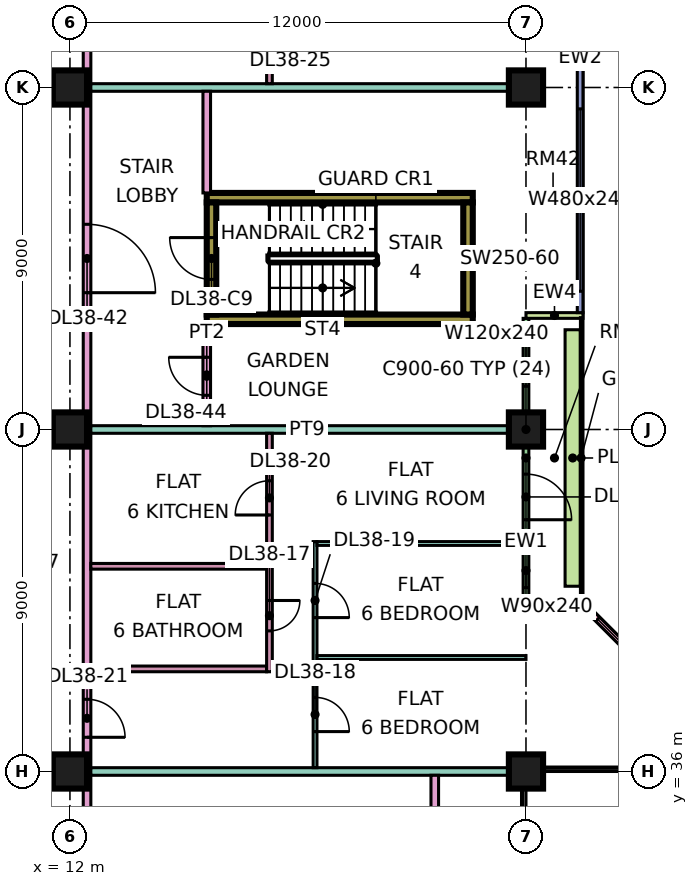
"""IFC4 building model, lengths in metres.
Left out: names, types, materials, properties, quantities, classifications, styles, units other than length and angle.
Written with IfcOpenShell. Run it as: python <this file> out.ifc"""

import sys

from ifc_helpers import new_model, si_unit, direction, frame, frame_2d, origin, origin_2d, place, context, subcontext, project, spatial, rectangle, extrude, element, fill, save


model = new_model("IFC4")
c1 = context("Model", 3, precision=1e-05, world=origin(), true_north=direction((0.0, 1.0)))
c2 = subcontext(c1, "Body", "Model", "MODEL_VIEW")
j1 = project(units=[si_unit("LENGTHUNIT", "METRE"), si_unit("PLANEANGLEUNIT", "RADIAN")], contexts=[c1])
p1 = place(None, origin())
s1 = spatial("IfcSite", under=j1, at=p1, CompositionType="ELEMENT")
p2 = place(p1, origin())
s2 = spatial("IfcBuilding", under=s1, at=p2, CompositionType="ELEMENT")
p3 = place(p2, frame((0.0, 0.0, 168.65)))
s3 = spatial("IfcBuildingStorey", under=s2, at=p3, CompositionType="ELEMENT", Elevation=168.65)
for number, where, z_axis, x_axis in (
    (1, (12.0, 36.0, 0.0), (0.0, 0.0, 1.0), (1.0, 0.0, 0.0)),
    (2, (12.0, 45.0, 0.0), (0.0, 0.0, 1.0), (1.0, 0.0, 0.0)),
    (3, (12.0, 54.0, 0.0), (0.0, 0.0, 1.0), (1.0, 0.0, 0.0)),
    (4, (24.0, 36.0, 0.0), (0.0, 0.0, 1.0), (1.0, 0.0, 0.0)),
    (5, (24.0, 45.0, 0.0), (0.0, 0.0, 1.0), (1.0, 0.0, 0.0)),
    (6, (24.0, 54.0, 0.0), (0.0, 0.0, 1.0), (1.0, 0.0, 0.0)),
):
    element("IfcColumn", number, at=place(p3, frame(where, z_axis=z_axis, x_axis=x_axis)), inside=s3, PredefinedType="COLUMN", context=c2, shape_type="SweptSolid", body=[
        extrude(rectangle(XDim=0.9, YDim=0.9, at=origin_2d()), origin(), (0.0, 0.0, 1.0), 3.75),
    ])
for number, where, z_axis, x_axis in (
    (7, (15.6, 47.9, 0.0), (0.0, 0.0, 1.0), (1.0, 0.0, 0.0)),
    (8, (15.6, 51.1, 0.0), (0.0, 0.0, 1.0), (1.0, 0.0, 0.0)),
):
    element("IfcWall", number, at=place(p3, frame(where, z_axis=z_axis, x_axis=x_axis)), inside=s3, PredefinedType="SHEAR", context=c2, shape_type="SweptSolid", body=[
        extrude(rectangle(XDim=7.0, YDim=0.25, at=frame_2d((3.5, 0.0))), origin(), (0.0, 0.0, 1.0), 3.75),
    ])
p4 = place(p3, frame((15.725, 48.025, 0.0), z_axis=(0.0, 0.0, 1.0), x_axis=(0.0, 1.0, 0.0)))
e9 = element("IfcWall", 9, at=p4, inside=s3, PredefinedType="SHEAR", context=c2, shape_type="SweptSolid", body=[
    extrude(rectangle(XDim=2.95, YDim=0.25, at=frame_2d((1.475, 0.0))), origin(), (0.0, 0.0, 1.0), 3.75),
])
p5 = place(p4, frame((0.925, 0.0, 0.0)))
e10 = element("IfcOpeningElement", 10, at=p5, cuts=e9, PredefinedType="OPENING", context=c2, shape_type="SweptSolid", body=[
    extrude(rectangle(XDim=1.1, YDim=2.2, at=frame_2d((0.55, 1.1))), frame((0.0, 0.135, 0.0), z_axis=(0.0, -1.0, 0.0), x_axis=(1.0, 0.0, 0.0)), (0.0, 0.0, 1.0), 0.27),
])
p6 = place(p3, frame((22.475, 48.025, 0.0), z_axis=(0.0, 0.0, 1.0), x_axis=(0.0, 1.0, 0.0)))
e11 = element("IfcWall", 11, at=p6, inside=s3, PredefinedType="SHEAR", context=c2, shape_type="SweptSolid", body=[
    extrude(rectangle(XDim=2.95, YDim=0.25, at=frame_2d((1.475, 0.0))), origin(), (0.0, 0.0, 1.0), 3.75),
])
p7 = place(p3, frame((28.447, 37.447, 0.0), z_axis=(0.0, 0.0, 1.0), x_axis=(-0.707106781187, 0.707106781187, 0.0)))
e12 = element("IfcWall", 12, at=p7, inside=s3, PredefinedType="SOLIDWALL", context=c2, shape_type="SweptSolid", body=[
    extrude(rectangle(XDim=4.243, YDim=0.15, at=frame_2d((2.121, 0.0))), origin(), (0.0, 0.0, 1.0), 3.35),
])
p8 = place(p7, frame((0.621, 0.0, 0.45)))
e13 = element("IfcOpeningElement", 13, at=p8, cuts=e12, PredefinedType="OPENING", context=c2, shape_type="SweptSolid", body=[
    extrude(rectangle(XDim=3.0, YDim=2.4, at=frame_2d((1.5, 1.2))), frame((0.0, 0.085, 0.0), z_axis=(0.0, -1.0, 0.0), x_axis=(1.0, 0.0, 0.0)), (0.0, 0.0, 1.0), 0.17),
])
p9 = place(p3, frame((24.0, 40.575, 0.0), z_axis=(0.0, 0.0, 1.0), x_axis=(0.0, 1.0, 0.0)))
e14 = element("IfcWall", 14, at=p9, inside=s3, PredefinedType="SOLIDWALL", context=c2, shape_type="SweptSolid", body=[
    extrude(rectangle(XDim=7.35, YDim=0.15, at=frame_2d((3.675, 0.0))), origin(), (0.0, 0.0, 1.0), 3.35),
])
p10 = place(p9, frame((0.262, 0.0, 0.45)))
e15 = element("IfcOpeningElement", 15, at=p10, cuts=e14, PredefinedType="OPENING", context=c2, shape_type="SweptSolid", body=[
    extrude(rectangle(XDim=0.9, YDim=2.4, at=frame_2d((0.45, 1.2))), frame((0.0, 0.085, 0.0), z_axis=(0.0, -1.0, 0.0), x_axis=(1.0, 0.0, 0.0)), (0.0, 0.0, 1.0), 0.17),
])
p11 = place(p9, frame((2.05, 0.0, 0.0)))
e16 = element("IfcOpeningElement", 16, at=p11, cuts=e14, PredefinedType="OPENING", context=c2, shape_type="SweptSolid", body=[
    extrude(rectangle(XDim=1.2, YDim=2.4, at=frame_2d((0.6, 1.2))), frame((0.0, 0.085, 0.0), z_axis=(0.0, -1.0, 0.0), x_axis=(1.0, 0.0, 0.0)), (0.0, 0.0, 1.0), 0.17),
])
p12 = place(p9, frame((5.562, 0.0, 0.45)))
e17 = element("IfcOpeningElement", 17, at=p12, cuts=e14, PredefinedType="OPENING", context=c2, shape_type="SweptSolid", body=[
    extrude(rectangle(XDim=1.2, YDim=2.4, at=frame_2d((0.6, 1.2))), frame((0.0, 0.085, 0.0), z_axis=(0.0, -1.0, 0.0), x_axis=(1.0, 0.0, 0.0)), (0.0, 0.0, 1.0), 0.17),
])
for number, where, z_axis, x_axis in (
    (18, (25.5, 40.5, 0.0), (0.0, 0.0, 1.0), (-1.0, 0.0, 0.0)),
    (19, (25.5, 48.0, 0.0), (0.0, 0.0, 1.0), (-1.0, 0.0, 0.0)),
):
    element("IfcWall", number, at=place(p3, frame(where, z_axis=z_axis, x_axis=x_axis)), inside=s3, PredefinedType="SOLIDWALL", context=c2, shape_type="SweptSolid", body=[
        extrude(rectangle(XDim=1.5, YDim=0.15, at=frame_2d((0.75, 0.0))), origin(), (0.0, 0.0, 1.0), 3.35),
    ])
p13 = place(p3, frame((25.425, 48.075, 0.0), z_axis=(0.0, 0.0, 1.0), x_axis=(0.0, 1.0, 0.0)))
e20 = element("IfcWall", 20, at=p13, inside=s3, PredefinedType="SOLIDWALL", context=c2, shape_type="SweptSolid", body=[
    extrude(rectangle(XDim=13.425, YDim=0.15, at=frame_2d((6.712, 0.0))), origin(), (0.0, 0.0, 1.0), 3.35),
])
p14 = place(p13, frame((0.562, 0.0, 0.45)))
e21 = element("IfcOpeningElement", 21, at=p14, cuts=e20, PredefinedType="OPENING", context=c2, shape_type="SweptSolid", body=[
    extrude(rectangle(XDim=4.8, YDim=2.4, at=frame_2d((2.4, 1.2))), frame((0.0, 0.085, 0.0), z_axis=(0.0, -1.0, 0.0), x_axis=(1.0, 0.0, 0.0)), (0.0, 0.0, 1.0), 0.17),
])
p15 = place(p13, frame((6.525, 0.0, 0.45)))
e22 = element("IfcOpeningElement", 22, at=p15, cuts=e20, PredefinedType="OPENING", context=c2, shape_type="SweptSolid", body=[
    extrude(rectangle(XDim=1.8, YDim=2.4, at=frame_2d((0.9, 1.2))), frame((0.0, 0.085, 0.0), z_axis=(0.0, -1.0, 0.0), x_axis=(1.0, 0.0, 0.0)), (0.0, 0.0, 1.0), 0.17),
])
p16 = place(p13, frame((9.525, 0.0, 0.45)))
e23 = element("IfcOpeningElement", 23, at=p16, cuts=e20, PredefinedType="OPENING", context=c2, shape_type="SweptSolid", body=[
    extrude(rectangle(XDim=1.8, YDim=2.4, at=frame_2d((0.9, 1.2))), frame((0.0, 0.085, 0.0), z_axis=(0.0, -1.0, 0.0), x_axis=(1.0, 0.0, 0.0)), (0.0, 0.0, 1.0), 0.17),
])
p17 = place(p13, frame((12.225, 0.0, 0.45)))
e24 = element("IfcOpeningElement", 24, at=p17, cuts=e20, PredefinedType="OPENING", context=c2, shape_type="SweptSolid", body=[
    extrude(rectangle(XDim=0.9, YDim=2.4, at=frame_2d((0.45, 1.2))), frame((0.0, 0.085, 0.0), z_axis=(0.0, -1.0, 0.0), x_axis=(1.0, 0.0, 0.0)), (0.0, 0.0, 1.0), 0.17),
])
p18 = place(p3, frame((25.229, 40.875, 0.0), z_axis=(0.0, 0.0, 1.0), x_axis=(0.0, 1.0, 0.0)))
e25 = element("IfcWall", 25, at=p18, inside=s3, PredefinedType="SOLIDWALL", context=c2, shape_type="SweptSolid", body=[
    extrude(rectangle(XDim=6.75, YDim=0.4, at=frame_2d((3.375, 0.0))), origin(), (0.0, 0.0, 1.0), 0.7),
])
p19 = place(p3, frame((12.45, 20.0, 0.0), z_axis=(0.0, 0.0, 1.0), x_axis=(0.0, 1.0, 0.0)))
e26 = element("IfcWall", 26, at=p19, inside=s3, PredefinedType="PARTITIONING", context=c2, shape_type="SweptSolid", body=[
    extrude(rectangle(XDim=42.926, YDim=0.2, at=frame_2d((21.463, 0.0))), origin(), (0.0, 0.0, 1.0), 3.35),
])
p20 = place(p19, frame((6.55, 0.0, 0.0)))
e27 = element("IfcOpeningElement", 27, at=p20, cuts=e26, PredefinedType="OPENING", context=c2, shape_type="SweptSolid", body=[
    extrude(rectangle(XDim=1.0, YDim=2.1, at=frame_2d((0.5, 1.05))), frame((0.0, 0.11, 0.0), z_axis=(0.0, -1.0, 0.0), x_axis=(1.0, 0.0, 0.0)), (0.0, 0.0, 1.0), 0.22),
])
p21 = place(p19, frame((12.25, 0.0, 0.0)))
e28 = element("IfcOpeningElement", 28, at=p21, cuts=e26, PredefinedType="OPENING", context=c2, shape_type="SweptSolid", body=[
    extrude(rectangle(XDim=1.6, YDim=2.1, at=frame_2d((0.8, 1.05))), frame((0.0, 0.11, 0.0), z_axis=(0.0, -1.0, 0.0), x_axis=(1.0, 0.0, 0.0)), (0.0, 0.0, 1.0), 0.22),
])
p22 = place(p19, frame((16.9, 0.0, 0.0)))
e29 = element("IfcOpeningElement", 29, at=p22, cuts=e26, PredefinedType="OPENING", context=c2, shape_type="SweptSolid", body=[
    extrude(rectangle(XDim=1.0, YDim=2.1, at=frame_2d((0.5, 1.05))), frame((0.0, 0.11, 0.0), z_axis=(0.0, -1.0, 0.0), x_axis=(1.0, 0.0, 0.0)), (0.0, 0.0, 1.0), 0.22),
])
p23 = place(p19, frame((40.9, 0.0, 0.0)))
e30 = element("IfcOpeningElement", 30, at=p23, cuts=e26, PredefinedType="OPENING", context=c2, shape_type="SweptSolid", body=[
    extrude(rectangle(XDim=1.0, YDim=2.1, at=frame_2d((0.5, 1.05))), frame((0.0, 0.11, 0.0), z_axis=(0.0, -1.0, 0.0), x_axis=(1.0, 0.0, 0.0)), (0.0, 0.0, 1.0), 0.22),
])
p24 = place(p19, frame((1.15, 0.0, 0.0)))
e31 = element("IfcOpeningElement", 31, at=p24, cuts=e26, PredefinedType="OPENING", context=c2, shape_type="SweptSolid", body=[
    extrude(rectangle(XDim=1.8, YDim=2.1, at=frame_2d((0.9, 1.05))), frame((0.0, 0.11, 0.0), z_axis=(0.0, -1.0, 0.0), x_axis=(1.0, 0.0, 0.0)), (0.0, 0.0, 1.0), 0.22),
])
p25 = place(p19, frame((28.6, 0.0, 0.0)))
e32 = element("IfcOpeningElement", 32, at=p25, cuts=e26, PredefinedType="OPENING", context=c2, shape_type="SweptSolid", body=[
    extrude(rectangle(XDim=1.8, YDim=2.1, at=frame_2d((0.9, 1.05))), frame((0.0, 0.11, 0.0), z_axis=(0.0, -1.0, 0.0), x_axis=(1.0, 0.0, 0.0)), (0.0, 0.0, 1.0), 0.22),
])
p26 = place(p3, frame((12.55, 36.0, 0.0), z_axis=(0.0, 0.0, 1.0), x_axis=(1.0, 0.0, 0.0)))
e33 = element("IfcWall", 33, at=p26, inside=s3, PredefinedType="PARTITIONING", context=c2, shape_type="SweptSolid", body=[
    extrude(rectangle(XDim=11.45, YDim=0.2, at=frame_2d((5.725, 0.0))), origin(), (0.0, 0.0, 1.0), 3.35),
])
for number, where, z_axis, x_axis in (
    (34, (12.55, 38.7, 0.0), (0.0, 0.0, 1.0), (1.0, 0.0, 0.0)),
    (35, (12.55, 41.4, 0.0), (0.0, 0.0, 1.0), (1.0, 0.0, 0.0)),
):
    element("IfcWall", number, at=place(p3, frame(where, z_axis=z_axis, x_axis=x_axis)), inside=s3, PredefinedType="PARTITIONING", context=c2, shape_type="SweptSolid", body=[
        extrude(rectangle(XDim=4.625, YDim=0.15, at=frame_2d((2.312, 0.0))), origin(), (0.0, 0.0, 1.0), 3.35),
    ])
p27 = place(p3, frame((12.55, 45.0, 0.0), z_axis=(0.0, 0.0, 1.0), x_axis=(1.0, 0.0, 0.0)))
e36 = element("IfcWall", 36, at=p27, inside=s3, PredefinedType="PARTITIONING", context=c2, shape_type="SweptSolid", body=[
    extrude(rectangle(XDim=11.376, YDim=0.2, at=frame_2d((5.688, 0.0))), origin(), (0.0, 0.0, 1.0), 3.35),
])
p28 = place(p3, frame((12.55, 54.0, 0.0), z_axis=(0.0, 0.0, 1.0), x_axis=(1.0, 0.0, 0.0)))
e37 = element("IfcWall", 37, at=p28, inside=s3, PredefinedType="PARTITIONING", context=c2, shape_type="SweptSolid", body=[
    extrude(rectangle(XDim=11.45, YDim=0.2, at=frame_2d((5.725, 0.0))), origin(), (0.0, 0.0, 1.0), 3.35),
])
p29 = place(p3, frame((15.6, 45.1, 0.0), z_axis=(0.0, 0.0, 1.0), x_axis=(0.0, 1.0, 0.0)))
e38 = element("IfcWall", 38, at=p29, inside=s3, PredefinedType="PARTITIONING", context=c2, shape_type="SweptSolid", body=[
    extrude(rectangle(XDim=2.675, YDim=0.2, at=frame_2d((1.337, 0.0))), origin(), (0.0, 0.0, 1.0), 3.35),
])
p30 = place(p29, frame((0.8, 0.0, 0.0)))
e39 = element("IfcOpeningElement", 39, at=p30, cuts=e38, PredefinedType="OPENING", context=c2, shape_type="SweptSolid", body=[
    extrude(rectangle(XDim=1.0, YDim=2.1, at=frame_2d((0.5, 1.05))), frame((0.0, 0.11, 0.0), z_axis=(0.0, -1.0, 0.0), x_axis=(1.0, 0.0, 0.0)), (0.0, 0.0, 1.0), 0.22),
])
p31 = place(p3, frame((15.6, 51.225, 0.0), z_axis=(0.0, 0.0, 1.0), x_axis=(0.0, 1.0, 0.0)))
e40 = element("IfcWall", 40, at=p31, inside=s3, PredefinedType="PARTITIONING", context=c2, shape_type="SweptSolid", body=[
    extrude(rectangle(XDim=2.675, YDim=0.2, at=frame_2d((1.337, 0.0))), origin(), (0.0, 0.0, 1.0), 3.35),
])
p32 = place(p3, frame((17.25, 38.625, 0.0), z_axis=(0.0, 0.0, 1.0), x_axis=(0.0, 1.0, 0.0)))
e41 = element("IfcWall", 41, at=p32, inside=s3, PredefinedType="PARTITIONING", context=c2, shape_type="SweptSolid", body=[
    extrude(rectangle(XDim=6.275, YDim=0.15, at=frame_2d((3.137, 0.0))), origin(), (0.0, 0.0, 1.0), 3.35),
])
p33 = place(p32, frame((1.075, 0.0, 0.0)))
e42 = element("IfcOpeningElement", 42, at=p33, cuts=e41, PredefinedType="OPENING", context=c2, shape_type="SweptSolid", body=[
    extrude(rectangle(XDim=0.8, YDim=2.1, at=frame_2d((0.4, 1.05))), frame((0.0, 0.085, 0.0), z_axis=(0.0, -1.0, 0.0), x_axis=(1.0, 0.0, 0.0)), (0.0, 0.0, 1.0), 0.17),
])
p34 = place(p32, frame((4.125, 0.0, 0.0)))
e43 = element("IfcOpeningElement", 43, at=p34, cuts=e41, PredefinedType="OPENING", context=c2, shape_type="SweptSolid", body=[
    extrude(rectangle(XDim=0.9, YDim=2.1, at=frame_2d((0.45, 1.05))), frame((0.0, 0.085, 0.0), z_axis=(0.0, -1.0, 0.0), x_axis=(1.0, 0.0, 0.0)), (0.0, 0.0, 1.0), 0.17),
])
p35 = place(p3, frame((17.25, 54.1, 0.0), z_axis=(0.0, 0.0, 1.0), x_axis=(0.0, 1.0, 0.0)))
e44 = element("IfcWall", 44, at=p35, inside=s3, PredefinedType="PARTITIONING", context=c2, shape_type="SweptSolid", body=[
    extrude(rectangle(XDim=5.675, YDim=0.15, at=frame_2d((2.837, 0.0))), origin(), (0.0, 0.0, 1.0), 3.35),
])
p36 = place(p35, frame((1.1, 0.0, 0.0)))
e45 = element("IfcOpeningElement", 45, at=p36, cuts=e44, PredefinedType="OPENING", context=c2, shape_type="SweptSolid", body=[
    extrude(rectangle(XDim=0.9, YDim=2.1, at=frame_2d((0.45, 1.05))), frame((0.0, 0.085, 0.0), z_axis=(0.0, -1.0, 0.0), x_axis=(1.0, 0.0, 0.0)), (0.0, 0.0, 1.0), 0.17),
])
p37 = place(p3, frame((18.45, 36.1, 0.0), z_axis=(0.0, 0.0, 1.0), x_axis=(0.0, 1.0, 0.0)))
e46 = element("IfcWall", 46, at=p37, inside=s3, PredefinedType="PARTITIONING", context=c2, shape_type="SweptSolid", body=[
    extrude(rectangle(XDim=5.95, YDim=0.1, at=frame_2d((2.975, 0.0))), origin(), (0.0, 0.0, 1.0), 3.35),
])
p38 = place(p37, frame((0.95, 0.0, 0.0)))
e47 = element("IfcOpeningElement", 47, at=p38, cuts=e46, PredefinedType="OPENING", context=c2, shape_type="SweptSolid", body=[
    extrude(rectangle(XDim=0.9, YDim=2.1, at=frame_2d((0.45, 1.05))), frame((0.0, 0.06, 0.0), z_axis=(0.0, -1.0, 0.0), x_axis=(1.0, 0.0, 0.0)), (0.0, 0.0, 1.0), 0.12),
])
p39 = place(p37, frame((3.95, 0.0, 0.0)))
e48 = element("IfcOpeningElement", 48, at=p39, cuts=e46, PredefinedType="OPENING", context=c2, shape_type="SweptSolid", body=[
    extrude(rectangle(XDim=0.9, YDim=2.1, at=frame_2d((0.45, 1.05))), frame((0.0, 0.06, 0.0), z_axis=(0.0, -1.0, 0.0), x_axis=(1.0, 0.0, 0.0)), (0.0, 0.0, 1.0), 0.12),
])
p40 = place(p3, frame((18.5, 39.0, 0.0), z_axis=(0.0, 0.0, 1.0), x_axis=(1.0, 0.0, 0.0)))
e49 = element("IfcWall", 49, at=p40, inside=s3, PredefinedType="PARTITIONING", context=c2, shape_type="SweptSolid", body=[
    extrude(rectangle(XDim=5.5, YDim=0.1, at=frame_2d((2.75, 0.0))), origin(), (0.0, 0.0, 1.0), 3.35),
])
p41 = place(p3, frame((18.5, 42.0, 0.0), z_axis=(0.0, 0.0, 1.0), x_axis=(1.0, 0.0, 0.0)))
e50 = element("IfcWall", 50, at=p41, inside=s3, PredefinedType="PARTITIONING", context=c2, shape_type="SweptSolid", body=[
    extrude(rectangle(XDim=5.426, YDim=0.1, at=frame_2d((2.713, 0.0))), origin(), (0.0, 0.0, 1.0), 3.35),
])
p42 = place(p3, frame((21.6, 23.9, 0.0), z_axis=(0.0, 0.0, 1.0), x_axis=(0.0, 1.0, 0.0)))
e51 = element("IfcWall", 51, at=p42, inside=s3, PredefinedType="PARTITIONING", context=c2, shape_type="SweptSolid", body=[
    extrude(rectangle(XDim=12.0, YDim=0.2, at=frame_2d((6.0, 0.0))), origin(), (0.0, 0.0, 1.0), 3.35),
])
p43 = place(p8, origin())
e52 = element("IfcWindow", 52, at=p43, inside=s3, PartitioningType="SINGLE_PANEL", PredefinedType="WINDOW", context=c2, shape_type="SweptSolid", body=[
    extrude(rectangle(XDim=3.0, YDim=2.4, at=frame_2d((1.5, 1.2))), frame((0.0, 0.03, 0.0), z_axis=(0.0, -1.0, 0.0), x_axis=(1.0, 0.0, 0.0)), (0.0, 0.0, 1.0), 0.06),
])
fill(e13, e52)
p44 = place(p10, origin())
e53 = element("IfcWindow", 53, at=p44, inside=s3, PartitioningType="SINGLE_PANEL", PredefinedType="WINDOW", context=c2, shape_type="SweptSolid", body=[
    extrude(rectangle(XDim=0.9, YDim=2.4, at=frame_2d((0.45, 1.2))), frame((0.0, 0.03, 0.0), z_axis=(0.0, -1.0, 0.0), x_axis=(1.0, 0.0, 0.0)), (0.0, 0.0, 1.0), 0.06),
])
fill(e15, e53)
p45 = place(p11, frame((1.2, 0.0, 0.0), z_axis=(0.0, 0.0, 1.0), x_axis=(-1.0, 0.0, 0.0)))
e54 = element("IfcDoor", 54, at=p45, inside=s3, OperationType="DOUBLE_DOOR_SINGLE_SWING", PredefinedType="DOOR", context=c2, shape_type="SweptSolid", body=[
    extrude(rectangle(XDim=1.2, YDim=2.4, at=frame_2d((0.6, 1.2))), frame((0.0, 0.025, 0.0), z_axis=(0.0, -1.0, 0.0), x_axis=(1.0, 0.0, 0.0)), (0.0, 0.0, 1.0), 0.05),
])
fill(e16, e54)
p46 = place(p12, origin())
e55 = element("IfcWindow", 55, at=p46, inside=s3, PartitioningType="SINGLE_PANEL", PredefinedType="WINDOW", context=c2, shape_type="SweptSolid", body=[
    extrude(rectangle(XDim=1.2, YDim=2.4, at=frame_2d((0.6, 1.2))), frame((0.0, 0.03, 0.0), z_axis=(0.0, -1.0, 0.0), x_axis=(1.0, 0.0, 0.0)), (0.0, 0.0, 1.0), 0.06),
])
fill(e17, e55)
p47 = place(p14, origin())
e56 = element("IfcWindow", 56, at=p47, inside=s3, PartitioningType="SINGLE_PANEL", PredefinedType="WINDOW", context=c2, shape_type="SweptSolid", body=[
    extrude(rectangle(XDim=4.8, YDim=2.4, at=frame_2d((2.4, 1.2))), frame((0.0, 0.03, 0.0), z_axis=(0.0, -1.0, 0.0), x_axis=(1.0, 0.0, 0.0)), (0.0, 0.0, 1.0), 0.06),
])
fill(e21, e56)
p48 = place(p15, origin())
e57 = element("IfcWindow", 57, at=p48, inside=s3, PartitioningType="SINGLE_PANEL", PredefinedType="WINDOW", context=c2, shape_type="SweptSolid", body=[
    extrude(rectangle(XDim=1.8, YDim=2.4, at=frame_2d((0.9, 1.2))), frame((0.0, 0.03, 0.0), z_axis=(0.0, -1.0, 0.0), x_axis=(1.0, 0.0, 0.0)), (0.0, 0.0, 1.0), 0.06),
])
fill(e22, e57)
p49 = place(p5, frame((1.1, 0.0, 0.0), z_axis=(0.0, 0.0, 1.0), x_axis=(-1.0, 0.0, 0.0)))
e58 = element("IfcDoor", 58, at=p49, inside=s3, OperationType="SINGLE_SWING_RIGHT", PredefinedType="DOOR", context=c2, shape_type="SweptSolid", body=[
    extrude(rectangle(XDim=1.1, YDim=2.2, at=frame_2d((0.55, 1.1))), frame((0.0, 0.025, 0.0), z_axis=(0.0, -1.0, 0.0), x_axis=(1.0, 0.0, 0.0)), (0.0, 0.0, 1.0), 0.05),
])
fill(e10, e58)
p50 = place(p33, origin())
e59 = element("IfcDoor", 59, at=p50, inside=s3, OperationType="SINGLE_SWING_RIGHT", PredefinedType="DOOR", context=c2, shape_type="SweptSolid", body=[
    extrude(rectangle(XDim=0.8, YDim=2.1, at=frame_2d((0.4, 1.05))), frame((0.0, 0.025, 0.0), z_axis=(0.0, -1.0, 0.0), x_axis=(1.0, 0.0, 0.0)), (0.0, 0.0, 1.0), 0.05),
])
fill(e42, e59)
p51 = place(p38, frame((0.9, 0.0, 0.0), z_axis=(0.0, 0.0, 1.0), x_axis=(-1.0, 0.0, 0.0)))
e60 = element("IfcDoor", 60, at=p51, inside=s3, OperationType="SINGLE_SWING_LEFT", PredefinedType="DOOR", context=c2, shape_type="SweptSolid", body=[
    extrude(rectangle(XDim=0.9, YDim=2.1, at=frame_2d((0.45, 1.05))), frame((0.0, 0.025, 0.0), z_axis=(0.0, -1.0, 0.0), x_axis=(1.0, 0.0, 0.0)), (0.0, 0.0, 1.0), 0.05),
])
fill(e47, e60)
p52 = place(p39, frame((0.9, 0.0, 0.0), z_axis=(0.0, 0.0, 1.0), x_axis=(-1.0, 0.0, 0.0)))
e61 = element("IfcDoor", 61, at=p52, inside=s3, OperationType="SINGLE_SWING_LEFT", PredefinedType="DOOR", context=c2, shape_type="SweptSolid", body=[
    extrude(rectangle(XDim=0.9, YDim=2.1, at=frame_2d((0.45, 1.05))), frame((0.0, 0.025, 0.0), z_axis=(0.0, -1.0, 0.0), x_axis=(1.0, 0.0, 0.0)), (0.0, 0.0, 1.0), 0.05),
])
fill(e48, e61)
p53 = place(p34, origin())
e62 = element("IfcDoor", 62, at=p53, inside=s3, OperationType="SINGLE_SWING_LEFT", PredefinedType="DOOR", context=c2, shape_type="SweptSolid", body=[
    extrude(rectangle(XDim=0.9, YDim=2.1, at=frame_2d((0.45, 1.05))), frame((0.0, 0.025, 0.0), z_axis=(0.0, -1.0, 0.0), x_axis=(1.0, 0.0, 0.0)), (0.0, 0.0, 1.0), 0.05),
])
fill(e43, e62)
p54 = place(p22, frame((1.0, 0.0, 0.0), z_axis=(0.0, 0.0, 1.0), x_axis=(-1.0, 0.0, 0.0)))
e63 = element("IfcDoor", 63, at=p54, inside=s3, OperationType="SINGLE_SWING_LEFT", PredefinedType="DOOR", context=c2, shape_type="SweptSolid", body=[
    extrude(rectangle(XDim=1.0, YDim=2.1, at=frame_2d((0.5, 1.05))), frame((0.0, 0.025, 0.0), z_axis=(0.0, -1.0, 0.0), x_axis=(1.0, 0.0, 0.0)), (0.0, 0.0, 1.0), 0.05),
])
fill(e29, e63)
p55 = place(p25, frame((1.8, 0.0, 0.0), z_axis=(0.0, 0.0, 1.0), x_axis=(-1.0, 0.0, 0.0)))
e64 = element("IfcDoor", 64, at=p55, inside=s3, OperationType="DOUBLE_DOOR_SINGLE_SWING", PredefinedType="DOOR", context=c2, shape_type="SweptSolid", body=[
    extrude(rectangle(XDim=1.8, YDim=2.1, at=frame_2d((0.9, 1.05))), frame((0.0, 0.025, 0.0), z_axis=(0.0, -1.0, 0.0), x_axis=(1.0, 0.0, 0.0)), (0.0, 0.0, 1.0), 0.05),
])
fill(e32, e64)
p56 = place(p30, frame((1.0, 0.0, 0.0), z_axis=(0.0, 0.0, 1.0), x_axis=(-1.0, 0.0, 0.0)))
e65 = element("IfcDoor", 65, at=p56, inside=s3, OperationType="SINGLE_SWING_RIGHT", PredefinedType="DOOR", context=c2, shape_type="SweptSolid", body=[
    extrude(rectangle(XDim=1.0, YDim=2.1, at=frame_2d((0.5, 1.05))), frame((0.0, 0.025, 0.0), z_axis=(0.0, -1.0, 0.0), x_axis=(1.0, 0.0, 0.0)), (0.0, 0.0, 1.0), 0.05),
])
fill(e39, e65)
save(model, sys.argv[1])
